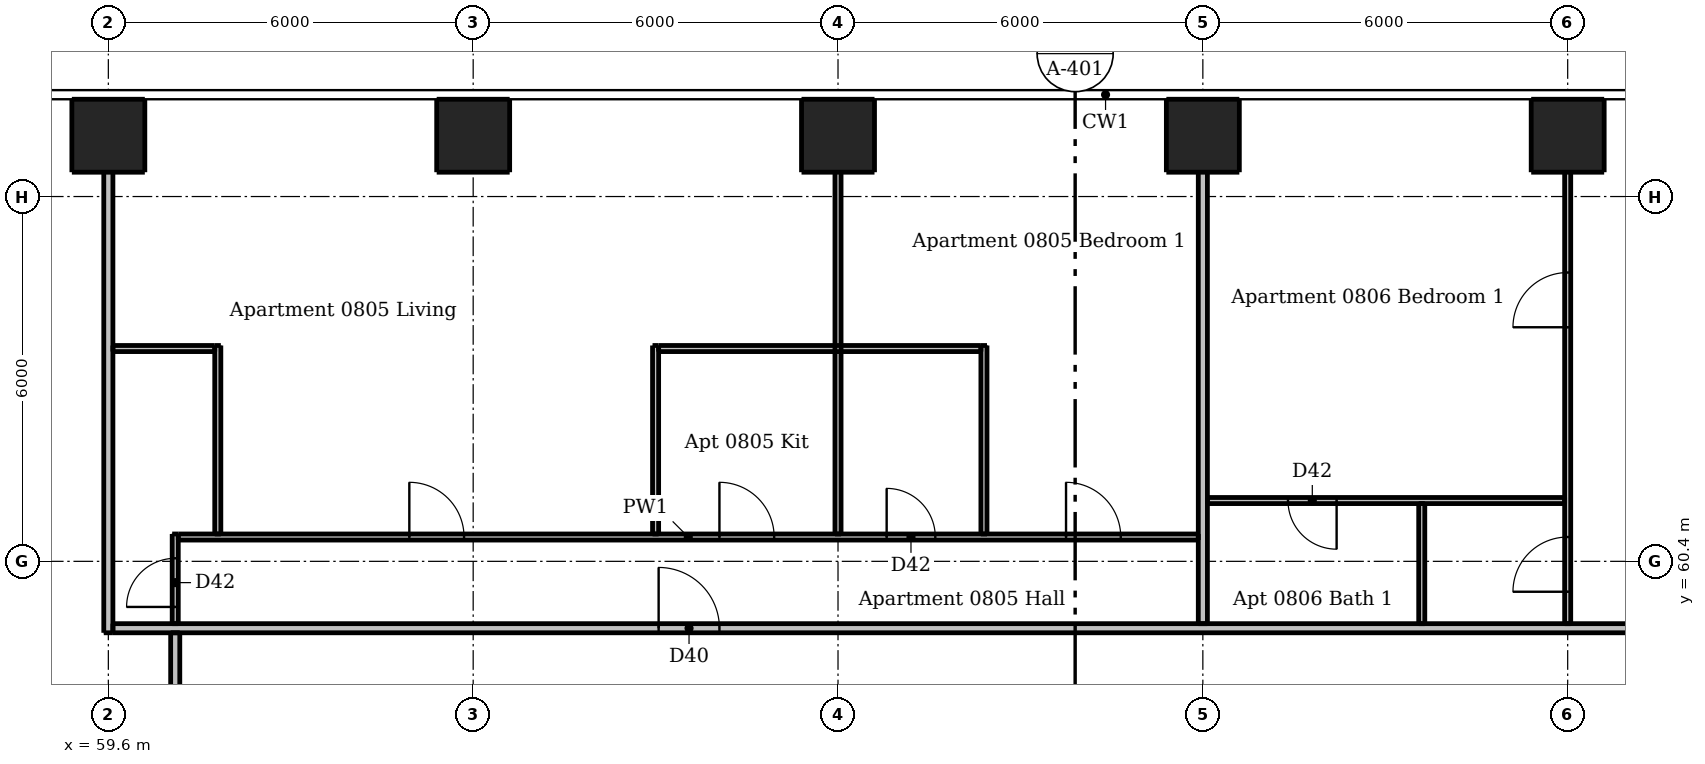
"""IFC4 building model, lengths in metres.
Left out: names, types, materials, properties, quantities, classifications, styles, units other than length and angle.
Written with IfcOpenShell. Run it as: python <this file> out.ifc"""

import sys

from ifc_helpers import new_model, si_unit, direction, frame, frame_2d, origin, origin_2d, place, context, subcontext, project, spatial, rectangle, extrude, element, fill, save


model = new_model("IFC4")
c1 = context("Model", 3, precision=1e-05, world=origin(), true_north=direction((0.0, 1.0)))
c2 = subcontext(c1, "Body", "Model", "MODEL_VIEW")
j1 = project(units=[si_unit("LENGTHUNIT", "METRE"), si_unit("PLANEANGLEUNIT", "RADIAN")], contexts=[c1])
p1 = place(None, origin())
s1 = spatial("IfcSite", under=j1, at=p1, CompositionType="ELEMENT")
p2 = place(p1, origin())
s2 = spatial("IfcBuilding", under=s1, at=p2, CompositionType="ELEMENT")
p3 = place(p2, frame((0.0, 0.0, 33.4)))
s3 = spatial("IfcBuildingStorey", under=s2, at=p3, CompositionType="ELEMENT", Elevation=33.4)
for number, where, z_axis, x_axis in (
    (1, (59.6, 67.4, 0.0), (0.0, 0.0, 1.0), (1.0, 0.0, 0.0)),
    (2, (65.6, 67.4, 0.0), (0.0, 0.0, 1.0), (1.0, 0.0, 0.0)),
    (3, (71.6, 67.4, 0.0), (0.0, 0.0, 1.0), (1.0, 0.0, 0.0)),
    (4, (77.6, 67.4, 0.0), (0.0, 0.0, 1.0), (1.0, 0.0, 0.0)),
    (5, (83.6, 67.4, 0.0), (0.0, 0.0, 1.0), (1.0, 0.0, 0.0)),
):
    element("IfcColumn", number, at=place(p3, frame(where, z_axis=z_axis, x_axis=x_axis)), inside=s3, PredefinedType="COLUMN", context=c2, shape_type="SweptSolid", body=[
        extrude(rectangle(XDim=1.2, YDim=1.2, at=origin_2d()), origin(), (0.0, 0.0, 1.0), 3.05),
    ])
p4 = place(p3, frame((60.7, 59.375, 0.0), z_axis=(0.0, 0.0, 1.0), x_axis=(0.0, 1.0, 0.0)))
e6 = element("IfcWall", 6, at=p4, inside=s3, PredefinedType="PARTITIONING", context=c2, shape_type="SweptSolid", body=[
    extrude(rectangle(XDim=1.475, YDim=0.1, at=frame_2d((0.738, 0.0))), origin(), (0.0, 0.0, 1.0), 3.05),
])
p5 = place(p4, frame((0.275, 0.0, 0.0)))
e7 = element("IfcOpeningElement", 7, at=p5, cuts=e6, PredefinedType="OPENING", context=c2, shape_type="SweptSolid", body=[
    extrude(rectangle(XDim=0.8, YDim=2.1, at=frame_2d((0.4, 1.05))), frame((0.0, 0.06, 0.0), z_axis=(0.0, -1.0, 0.0), x_axis=(1.0, 0.0, 0.0)), (0.0, 0.0, 1.0), 0.12),
])
for number, where, z_axis, x_axis in (
    (8, (61.4, 60.85, 0.0), (0.0, 0.0, 1.0), (0.0, 1.0, 0.0)),
    (9, (68.6, 60.85, 0.0), (0.0, 0.0, 1.0), (0.0, 1.0, 0.0)),
):
    element("IfcWall", number, at=place(p3, frame(where, z_axis=z_axis, x_axis=x_axis)), inside=s3, PredefinedType="PARTITIONING", context=c2, shape_type="SweptSolid", body=[
        extrude(rectangle(XDim=3.1, YDim=0.1, at=frame_2d((1.55, 0.0))), origin(), (0.0, 0.0, 1.0), 3.05),
    ])
p6 = place(p3, frame((71.6, 60.85, 0.0), z_axis=(0.0, 0.0, 1.0), x_axis=(0.0, 1.0, 0.0)))
e10 = element("IfcWall", 10, at=p6, inside=s3, PredefinedType="PARTITIONING", context=c2, shape_type="SweptSolid", body=[
    extrude(rectangle(XDim=7.15, YDim=0.1, at=frame_2d((3.575, 0.0))), origin(), (0.0, 0.0, 1.0), 2.516),
])
p7 = place(p3, frame((74.0, 60.85, 0.0), z_axis=(0.0, 0.0, 1.0), x_axis=(0.0, 1.0, 0.0)))
e11 = element("IfcWall", 11, at=p7, inside=s3, PredefinedType="PARTITIONING", context=c2, shape_type="SweptSolid", body=[
    extrude(rectangle(XDim=3.1, YDim=0.1, at=frame_2d((1.55, 0.0))), origin(), (0.0, 0.0, 1.0), 3.05),
])
p8 = place(p3, frame((81.2, 59.375, 0.0), z_axis=(0.0, 0.0, 1.0), x_axis=(0.0, 1.0, 0.0)))
e12 = element("IfcWall", 12, at=p8, inside=s3, PredefinedType="PARTITIONING", context=c2, shape_type="SweptSolid", body=[
    extrude(rectangle(XDim=1.975, YDim=0.1, at=frame_2d((0.988, 0.0))), origin(), (0.0, 0.0, 1.0), 3.05),
])
p9 = place(p3, frame((83.6, 59.375, 0.0), z_axis=(0.0, 0.0, 1.0), x_axis=(0.0, 1.0, 0.0)))
e13 = element("IfcWall", 13, at=p9, inside=s3, PredefinedType="PARTITIONING", context=c2, shape_type="SweptSolid", body=[
    extrude(rectangle(XDim=8.625, YDim=0.1, at=frame_2d((4.312, 0.0))), origin(), (0.0, 0.0, 1.0), 2.516),
])
p10 = place(p9, frame((0.525, 0.0, 0.0)))
e14 = element("IfcOpeningElement", 14, at=p10, cuts=e13, PredefinedType="OPENING", context=c2, shape_type="SweptSolid", body=[
    extrude(rectangle(XDim=0.9, YDim=2.1, at=frame_2d((0.45, 1.05))), frame((0.0, 0.06, 0.0), z_axis=(0.0, -1.0, 0.0), x_axis=(1.0, 0.0, 0.0)), (0.0, 0.0, 1.0), 0.12),
])
p11 = place(p9, frame((4.875, 0.0, 0.0)))
e15 = element("IfcOpeningElement", 15, at=p11, cuts=e13, PredefinedType="OPENING", context=c2, shape_type="SweptSolid", body=[
    extrude(rectangle(XDim=0.9, YDim=2.1, at=frame_2d((0.45, 1.05))), frame((0.0, 0.06, 0.0), z_axis=(0.0, -1.0, 0.0), x_axis=(1.0, 0.0, 0.0)), (0.0, 0.0, 1.0), 0.12),
])
p12 = place(p3, frame((59.675, 63.9, 0.0), z_axis=(0.0, 0.0, 1.0), x_axis=(1.0, 0.0, 0.0)))
e16 = element("IfcWall", 16, at=p12, inside=s3, PredefinedType="PARTITIONING", context=c2, shape_type="SweptSolid", body=[
    extrude(rectangle(XDim=1.675, YDim=0.1, at=frame_2d((0.837, 0.0))), origin(), (0.0, 0.0, 1.0), 3.05),
])
p13 = place(p3, frame((68.65, 63.9, 0.0), z_axis=(0.0, 0.0, 1.0), x_axis=(1.0, 0.0, 0.0)))
e17 = element("IfcWall", 17, at=p13, inside=s3, PredefinedType="PARTITIONING", context=c2, shape_type="SweptSolid", body=[
    extrude(rectangle(XDim=5.3, YDim=0.1, at=frame_2d((2.65, 0.0))), origin(), (0.0, 0.0, 1.0), 3.05),
])
p14 = place(p3, frame((83.55, 61.4, 0.0), z_axis=(0.0, 0.0, 1.0), x_axis=(-1.0, 0.0, 0.0)))
e18 = element("IfcWall", 18, at=p14, inside=s3, PredefinedType="PARTITIONING", context=c2, shape_type="SweptSolid", body=[
    extrude(rectangle(XDim=5.875, YDim=0.1, at=frame_2d((2.938, 0.0))), origin(), (0.0, 0.0, 1.0), 3.05),
])
p15 = place(p14, frame((3.75, 0.0, 0.0)))
e19 = element("IfcOpeningElement", 19, at=p15, cuts=e18, PredefinedType="OPENING", context=c2, shape_type="SweptSolid", body=[
    extrude(rectangle(XDim=0.8, YDim=2.1, at=frame_2d((0.4, 1.05))), frame((0.0, 0.06, 0.0), z_axis=(0.0, -1.0, 0.0), x_axis=(1.0, 0.0, 0.0)), (0.0, 0.0, 1.0), 0.12),
])
p16 = place(p3, frame((60.75, 60.8, 0.0), z_axis=(0.0, 0.0, 1.0), x_axis=(1.0, 0.0, 0.0)))
e20 = element("IfcWall", 20, at=p16, inside=s3, PredefinedType="PARTITIONING", context=c2, shape_type="SweptSolid", body=[
    extrude(rectangle(XDim=16.775, YDim=0.1, at=frame_2d((8.387, 0.0))), origin(), (0.0, 0.0, 1.0), 3.05),
])
p17 = place(p16, frame((3.8, 0.0, 0.0)))
e21 = element("IfcOpeningElement", 21, at=p17, cuts=e20, PredefinedType="OPENING", context=c2, shape_type="SweptSolid", body=[
    extrude(rectangle(XDim=0.9, YDim=2.1, at=frame_2d((0.45, 1.05))), frame((0.0, 0.06, 0.0), z_axis=(0.0, -1.0, 0.0), x_axis=(1.0, 0.0, 0.0)), (0.0, 0.0, 1.0), 0.12),
])
p18 = place(p16, frame((8.9, 0.0, 0.0)))
e22 = element("IfcOpeningElement", 22, at=p18, cuts=e20, PredefinedType="OPENING", context=c2, shape_type="SweptSolid", body=[
    extrude(rectangle(XDim=0.9, YDim=2.1, at=frame_2d((0.45, 1.05))), frame((0.0, 0.06, 0.0), z_axis=(0.0, -1.0, 0.0), x_axis=(1.0, 0.0, 0.0)), (0.0, 0.0, 1.0), 0.12),
])
p19 = place(p16, frame((14.6, 0.0, 0.0)))
e23 = element("IfcOpeningElement", 23, at=p19, cuts=e20, PredefinedType="OPENING", context=c2, shape_type="SweptSolid", body=[
    extrude(rectangle(XDim=0.9, YDim=2.1, at=frame_2d((0.45, 1.05))), frame((0.0, 0.06, 0.0), z_axis=(0.0, -1.0, 0.0), x_axis=(1.0, 0.0, 0.0)), (0.0, 0.0, 1.0), 0.12),
])
p20 = place(p16, frame((11.65, 0.0, 0.0)))
e24 = element("IfcOpeningElement", 24, at=p20, cuts=e20, PredefinedType="OPENING", context=c2, shape_type="SweptSolid", body=[
    extrude(rectangle(XDim=0.8, YDim=2.1, at=frame_2d((0.4, 1.05))), frame((0.0, 0.06, 0.0), z_axis=(0.0, -1.0, 0.0), x_axis=(1.0, 0.0, 0.0)), (0.0, 0.0, 1.0), 0.12),
])
p21 = place(p3, frame((59.6, 59.225, 0.0), z_axis=(0.0, 0.0, 1.0), x_axis=(0.0, 1.0, 0.0)))
e25 = element("IfcWall", 25, at=p21, inside=s3, PredefinedType="PARTITIONING", context=c2, shape_type="SweptSolid", body=[
    extrude(rectangle(XDim=8.775, YDim=0.15, at=frame_2d((4.387, 0.0))), origin(), (0.0, 0.0, 1.0), 2.51),
])
p22 = place(p3, frame((60.7, 30.325, 0.0), z_axis=(0.0, 0.0, 1.0), x_axis=(0.0, 1.0, 0.0)))
e26 = element("IfcWall", 26, at=p22, inside=s3, PredefinedType="PARTITIONING", context=c2, shape_type="SweptSolid", body=[
    extrude(rectangle(XDim=28.9, YDim=0.15, at=frame_2d((14.45, 0.0))), origin(), (0.0, 0.0, 1.0), 3.05),
])
p23 = place(p22, frame((9.225, 0.0, 0.0)))
e27 = element("IfcOpeningElement", 27, at=p23, cuts=e26, PredefinedType="OPENING", context=c2, shape_type="SweptSolid", body=[
    extrude(rectangle(XDim=1.0, YDim=2.1, at=frame_2d((0.5, 1.05))), frame((0.0, 0.085, 0.0), z_axis=(0.0, -1.0, 0.0), x_axis=(1.0, 0.0, 0.0)), (0.0, 0.0, 1.0), 0.17),
])
p24 = place(p22, frame((26.025, 0.0, 0.0)))
e28 = element("IfcOpeningElement", 28, at=p24, cuts=e26, PredefinedType="OPENING", context=c2, shape_type="SweptSolid", body=[
    extrude(rectangle(XDim=1.0, YDim=2.1, at=frame_2d((0.5, 1.05))), frame((0.0, 0.085, 0.0), z_axis=(0.0, -1.0, 0.0), x_axis=(1.0, 0.0, 0.0)), (0.0, 0.0, 1.0), 0.17),
])
p25 = place(p3, frame((77.6, 59.375, 0.0), z_axis=(0.0, 0.0, 1.0), x_axis=(0.0, 1.0, 0.0)))
e29 = element("IfcWall", 29, at=p25, inside=s3, PredefinedType="PARTITIONING", context=c2, shape_type="SweptSolid", body=[
    extrude(rectangle(XDim=8.625, YDim=0.15, at=frame_2d((4.312, 0.0))), origin(), (0.0, 0.0, 1.0), 2.516),
])
p26 = place(p3, frame((59.675, 59.3, 0.0), z_axis=(0.0, 0.0, 1.0), x_axis=(1.0, 0.0, 0.0)))
e30 = element("IfcWall", 30, at=p26, inside=s3, PredefinedType="PARTITIONING", context=c2, shape_type="SweptSolid", body=[
    extrude(rectangle(XDim=28.55, YDim=0.15, at=frame_2d((14.275, 0.0))), origin(), (0.0, 0.0, 1.0), 3.05),
])
p27 = place(p26, frame((8.975, 0.0, 0.0)))
e31 = element("IfcOpeningElement", 31, at=p27, cuts=e30, PredefinedType="OPENING", context=c2, shape_type="SweptSolid", body=[
    extrude(rectangle(XDim=1.0, YDim=2.1, at=frame_2d((0.5, 1.05))), frame((0.0, 0.085, 0.0), z_axis=(0.0, -1.0, 0.0), x_axis=(1.0, 0.0, 0.0)), (0.0, 0.0, 1.0), 0.17),
])
p28 = place(p26, frame((25.775, 0.0, 0.0)))
e32 = element("IfcOpeningElement", 32, at=p28, cuts=e30, PredefinedType="OPENING", context=c2, shape_type="SweptSolid", body=[
    extrude(rectangle(XDim=1.0, YDim=2.1, at=frame_2d((0.5, 1.05))), frame((0.0, 0.085, 0.0), z_axis=(0.0, -1.0, 0.0), x_axis=(1.0, 0.0, 0.0)), (0.0, 0.0, 1.0), 0.17),
])
p29 = place(p27, origin())
e33 = element("IfcDoor", 33, at=p29, inside=s3, OperationType="SINGLE_SWING_LEFT", PredefinedType="DOOR", context=c2, shape_type="SweptSolid", body=[
    extrude(rectangle(XDim=1.0, YDim=2.1, at=frame_2d((0.5, 1.05))), frame((0.0, 0.025, 0.0), z_axis=(0.0, -1.0, 0.0), x_axis=(1.0, 0.0, 0.0)), (0.0, 0.0, 1.0), 0.05),
])
fill(e31, e33)
p30 = place(p17, origin())
e34 = element("IfcDoor", 34, at=p30, inside=s3, OperationType="SINGLE_SWING_LEFT", PredefinedType="DOOR", context=c2, shape_type="SweptSolid", body=[
    extrude(rectangle(XDim=0.9, YDim=2.1, at=frame_2d((0.45, 1.05))), frame((0.0, 0.025, 0.0), z_axis=(0.0, -1.0, 0.0), x_axis=(1.0, 0.0, 0.0)), (0.0, 0.0, 1.0), 0.05),
])
fill(e21, e34)
p31 = place(p18, origin())
e35 = element("IfcDoor", 35, at=p31, inside=s3, OperationType="SINGLE_SWING_LEFT", PredefinedType="DOOR", context=c2, shape_type="SweptSolid", body=[
    extrude(rectangle(XDim=0.9, YDim=2.1, at=frame_2d((0.45, 1.05))), frame((0.0, 0.025, 0.0), z_axis=(0.0, -1.0, 0.0), x_axis=(1.0, 0.0, 0.0)), (0.0, 0.0, 1.0), 0.05),
])
fill(e22, e35)
p32 = place(p5, origin())
e36 = element("IfcDoor", 36, at=p32, inside=s3, OperationType="SINGLE_SWING_LEFT", PredefinedType="DOOR", context=c2, shape_type="SweptSolid", body=[
    extrude(rectangle(XDim=0.8, YDim=2.1, at=frame_2d((0.4, 1.05))), frame((0.0, 0.025, 0.0), z_axis=(0.0, -1.0, 0.0), x_axis=(1.0, 0.0, 0.0)), (0.0, 0.0, 1.0), 0.05),
])
fill(e7, e36)
p33 = place(p19, origin())
e37 = element("IfcDoor", 37, at=p33, inside=s3, OperationType="SINGLE_SWING_LEFT", PredefinedType="DOOR", context=c2, shape_type="SweptSolid", body=[
    extrude(rectangle(XDim=0.9, YDim=2.1, at=frame_2d((0.45, 1.05))), frame((0.0, 0.025, 0.0), z_axis=(0.0, -1.0, 0.0), x_axis=(1.0, 0.0, 0.0)), (0.0, 0.0, 1.0), 0.05),
])
fill(e23, e37)
p34 = place(p20, origin())
e38 = element("IfcDoor", 38, at=p34, inside=s3, OperationType="SINGLE_SWING_LEFT", PredefinedType="DOOR", context=c2, shape_type="SweptSolid", body=[
    extrude(rectangle(XDim=0.8, YDim=2.1, at=frame_2d((0.4, 1.05))), frame((0.0, 0.025, 0.0), z_axis=(0.0, -1.0, 0.0), x_axis=(1.0, 0.0, 0.0)), (0.0, 0.0, 1.0), 0.05),
])
fill(e24, e38)
p35 = place(p10, origin())
e39 = element("IfcDoor", 39, at=p35, inside=s3, OperationType="SINGLE_SWING_LEFT", PredefinedType="DOOR", context=c2, shape_type="SweptSolid", body=[
    extrude(rectangle(XDim=0.9, YDim=2.1, at=frame_2d((0.45, 1.05))), frame((0.0, 0.025, 0.0), z_axis=(0.0, -1.0, 0.0), x_axis=(1.0, 0.0, 0.0)), (0.0, 0.0, 1.0), 0.05),
])
fill(e14, e39)
p36 = place(p11, origin())
e40 = element("IfcDoor", 40, at=p36, inside=s3, OperationType="SINGLE_SWING_LEFT", PredefinedType="DOOR", context=c2, shape_type="SweptSolid", body=[
    extrude(rectangle(XDim=0.9, YDim=2.1, at=frame_2d((0.45, 1.05))), frame((0.0, 0.025, 0.0), z_axis=(0.0, -1.0, 0.0), x_axis=(1.0, 0.0, 0.0)), (0.0, 0.0, 1.0), 0.05),
])
fill(e15, e40)
p37 = place(p15, origin())
e41 = element("IfcDoor", 41, at=p37, inside=s3, OperationType="SINGLE_SWING_LEFT", PredefinedType="DOOR", context=c2, shape_type="SweptSolid", body=[
    extrude(rectangle(XDim=0.8, YDim=2.1, at=frame_2d((0.4, 1.05))), frame((0.0, 0.025, 0.0), z_axis=(0.0, -1.0, 0.0), x_axis=(1.0, 0.0, 0.0)), (0.0, 0.0, 1.0), 0.05),
])
fill(e19, e41)
save(model, sys.argv[1])
